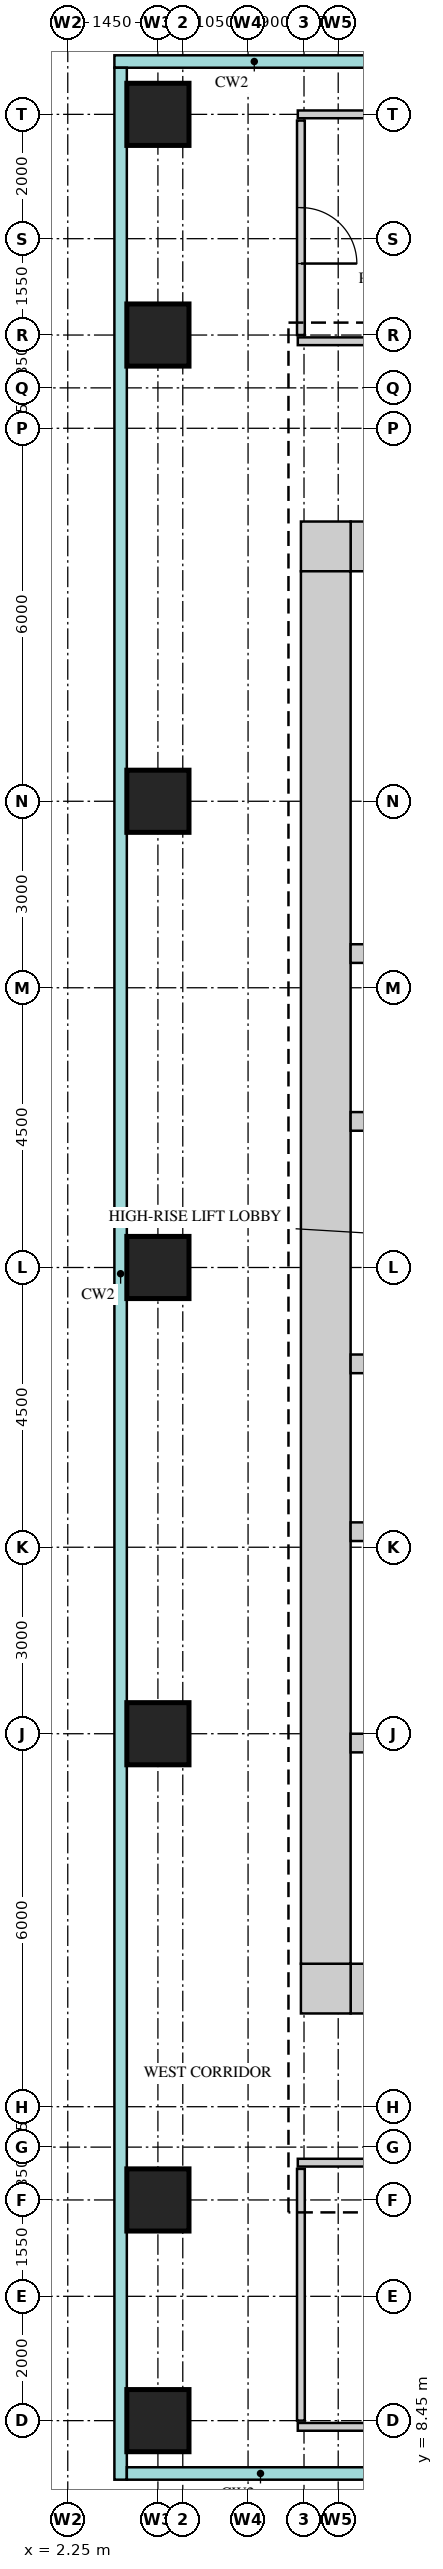
"""IFC4 building model, lengths in metres.
Left out: names, types, materials, properties, quantities, classifications, styles, units other than length and angle.
Written with IfcOpenShell. Run it as: python <this file> out.ifc"""

import sys

from ifc_helpers import new_model, si_unit, direction, frame, frame_2d, origin, origin_2d, place, context, subcontext, project, spatial, rectangle, extrude, source, transform, mapped, element, fill, save


model = new_model("IFC4")
c1 = context("Model", 3, precision=1e-05, world=origin(), true_north=direction((0.0, 1.0)))
c2 = subcontext(c1, "Body", "Model", "MODEL_VIEW")
j1 = project(units=[si_unit("LENGTHUNIT", "METRE"), si_unit("PLANEANGLEUNIT", "RADIAN")], contexts=[c1])
p1 = place(None, origin())
s1 = spatial("IfcSite", under=j1, at=p1, CompositionType="ELEMENT")
p2 = place(p1, origin())
s2 = spatial("IfcBuilding", under=s1, at=p2, CompositionType="ELEMENT")
p3 = place(p2, frame((0.0, 0.0, 184.7)))
s3 = spatial("IfcBuildingStorey", under=s2, at=p3, CompositionType="ELEMENT", Elevation=184.7)
m1 = source(origin(), c2, "Body", "SweptSolid", [
    extrude(rectangle(XDim=13.4, YDim=0.8, at=frame_2d((6.7, 0.0))), origin(), (0.0, 0.0, 1.0), 3.75),
])
p4 = place(p3, frame((6.8, 38.6, 0.0), z_axis=(0.0, 0.0, 1.0), x_axis=(1.0, 0.0, 0.0)))
e1 = element("IfcWall", 1, at=p4, inside=s3, PredefinedType="SHEAR", context=c2, shape_type="MappedRepresentation", body=[
    mapped(m1, transform((0.0, 0.0, 0.0))),
])
m2 = source(origin(), c2, "Body", "SweptSolid", [
    extrude(rectangle(XDim=0.9, YDim=2.1, at=frame_2d((0.45, 1.05))), frame((0.0, 0.41, 0.0), z_axis=(0.0, -1.0, 0.0), x_axis=(1.0, 0.0, 0.0)), (0.0, 0.0, 1.0), 0.82),
])
p5 = place(p4, frame((1.25, 0.0, 0.0)))
e2 = element("IfcOpeningElement", 2, at=p5, cuts=e1, PredefinedType="OPENING", context=c2, shape_type="MappedRepresentation", body=[
    mapped(m2, transform((0.0, 0.0, 0.0))),
])
p6 = place(p4, frame((4.65, 0.0, 0.0)))
e3 = element("IfcOpeningElement", 3, at=p6, cuts=e1, PredefinedType="OPENING", context=c2, shape_type="MappedRepresentation", body=[
    mapped(m2, transform((0.0, 0.0, 0.0))),
])
m3 = source(origin(), c2, "Body", "SweptSolid", [
    extrude(rectangle(XDim=1.0, YDim=2.1, at=frame_2d((0.5, 1.05))), frame((0.0, 0.41, 0.0), z_axis=(0.0, -1.0, 0.0), x_axis=(1.0, 0.0, 0.0)), (0.0, 0.0, 1.0), 0.82),
])
p7 = place(p4, frame((8.0, 0.0, 0.0)))
e4 = element("IfcOpeningElement", 4, at=p7, cuts=e1, PredefinedType="OPENING", context=c2, shape_type="MappedRepresentation", body=[
    mapped(m3, transform((0.0, 0.0, 0.0))),
])
p8 = place(p4, frame((11.35, 0.0, 0.0)))
e5 = element("IfcOpeningElement", 5, at=p8, cuts=e1, PredefinedType="OPENING", context=c2, shape_type="MappedRepresentation", body=[
    mapped(m2, transform((0.0, 0.0, 0.0))),
])
m4 = source(origin(), c2, "Body", "SweptSolid", [
    extrude(rectangle(XDim=0.8, YDim=0.8, at=frame_2d((0.4, 0.0))), origin(), (0.0, 0.0, 1.0), 3.75),
])
p9 = place(p3, frame((6.0, 38.6, 0.0), z_axis=(0.0, 0.0, 1.0), x_axis=(1.0, 0.0, 0.0)))
e6 = element("IfcWall", 6, at=p9, inside=s3, PredefinedType="SHEAR", context=c2, shape_type="MappedRepresentation", body=[
    mapped(m4, transform((0.0, 0.0, 0.0))),
])
p10 = place(p3, frame((6.8, 15.4, 0.0), z_axis=(0.0, 0.0, 1.0), x_axis=(1.0, 0.0, 0.0)))
e7 = element("IfcWall", 7, at=p10, inside=s3, PredefinedType="SHEAR", context=c2, shape_type="MappedRepresentation", body=[
    mapped(m1, transform((0.0, 0.0, 0.0))),
])
m5 = source(origin(), c2, "Body", "SweptSolid", [
    extrude(rectangle(XDim=1.2, YDim=2.1, at=frame_2d((0.6, 1.05))), frame((0.0, 0.41, 0.0), z_axis=(0.0, -1.0, 0.0), x_axis=(1.0, 0.0, 0.0)), (0.0, 0.0, 1.0), 0.82),
])
p11 = place(p10, frame((5.4, 0.0, 0.0)))
e8 = element("IfcOpeningElement", 8, at=p11, cuts=e7, PredefinedType="OPENING", context=c2, shape_type="MappedRepresentation", body=[
    mapped(m5, transform((0.0, 0.0, 0.0))),
])
p12 = place(p10, frame((2.05, 0.0, 0.0)))
e9 = element("IfcOpeningElement", 9, at=p12, cuts=e7, PredefinedType="OPENING", context=c2, shape_type="MappedRepresentation", body=[
    mapped(m5, transform((0.0, 0.0, 0.0))),
])
p13 = place(p10, frame((7.9, 0.0, 0.0)))
e10 = element("IfcOpeningElement", 10, at=p13, cuts=e7, PredefinedType="OPENING", context=c2, shape_type="MappedRepresentation", body=[
    mapped(m3, transform((0.0, 0.0, 0.0))),
])
p14 = place(p3, frame((6.0, 15.4, 0.0), z_axis=(0.0, 0.0, 1.0), x_axis=(1.0, 0.0, 0.0)))
e11 = element("IfcWall", 11, at=p14, inside=s3, PredefinedType="SHEAR", context=c2, shape_type="MappedRepresentation", body=[
    mapped(m4, transform((0.0, 0.0, 0.0))),
])
m6 = source(origin(), c2, "Body", "SweptSolid", [
    extrude(rectangle(XDim=22.4, YDim=0.8, at=frame_2d((11.2, 0.0))), origin(), (0.0, 0.0, 1.0), 3.75),
])
p15 = place(p3, frame((6.4, 15.8, 0.0), z_axis=(0.0, 0.0, 1.0), x_axis=(0.0, 1.0, 0.0)))
e12 = element("IfcWall", 12, at=p15, inside=s3, PredefinedType="SHEAR", context=c2, shape_type="MappedRepresentation", body=[
    mapped(m6, transform((0.0, 0.0, 0.0))),
])
m7 = source(origin(), c2, "Body", "SweptSolid", [
    extrude(rectangle(XDim=13.4, YDim=0.3, at=frame_2d((6.7, 0.0))), origin(), (0.0, 0.0, 1.0), 3.75),
])
p16 = place(p3, frame((6.8, 22.75, 0.0), z_axis=(0.0, 0.0, 1.0), x_axis=(1.0, 0.0, 0.0)))
e13 = element("IfcWall", 13, at=p16, inside=s3, PredefinedType="STANDARD", context=c2, shape_type="MappedRepresentation", body=[
    mapped(m7, transform((0.0, 0.0, 0.0))),
])
m8 = source(origin(), c2, "Body", "SweptSolid", [
    extrude(rectangle(XDim=9.275, YDim=0.3, at=frame_2d((4.637, 0.0))), origin(), (0.0, 0.0, 1.0), 3.75),
])
p17 = place(p3, frame((6.8, 19.35, 0.0), z_axis=(0.0, 0.0, 1.0), x_axis=(1.0, 0.0, 0.0)))
e14 = element("IfcWall", 14, at=p17, inside=s3, PredefinedType="STANDARD", context=c2, shape_type="MappedRepresentation", body=[
    mapped(m8, transform((0.0, 0.0, 0.0))),
])
m9 = source(origin(), c2, "Body", "SweptSolid", [
    extrude(rectangle(XDim=1.2, YDim=2.1, at=frame_2d((0.6, 1.05))), frame((0.0, 0.16, 0.0), z_axis=(0.0, -1.0, 0.0), x_axis=(1.0, 0.0, 0.0)), (0.0, 0.0, 1.0), 0.32),
])
p18 = place(p17, frame((0.85, 0.0, 0.0)))
e15 = element("IfcOpeningElement", 15, at=p18, cuts=e14, PredefinedType="OPENING", context=c2, shape_type="MappedRepresentation", body=[
    mapped(m9, transform((0.0, 0.0, 0.0))),
])
p19 = place(p17, frame((3.2, 0.0, 0.0)))
e16 = element("IfcOpeningElement", 16, at=p19, cuts=e14, PredefinedType="OPENING", context=c2, shape_type="MappedRepresentation", body=[
    mapped(m9, transform((0.0, 0.0, 0.0))),
])
p20 = place(p17, frame((5.45, 0.0, 0.0)))
e17 = element("IfcOpeningElement", 17, at=p20, cuts=e14, PredefinedType="OPENING", context=c2, shape_type="MappedRepresentation", body=[
    mapped(m9, transform((0.0, 0.0, 0.0))),
])
p21 = place(p17, frame((7.6, 0.0, 0.0)))
e18 = element("IfcOpeningElement", 18, at=p21, cuts=e14, PredefinedType="OPENING", context=c2, shape_type="MappedRepresentation", body=[
    mapped(m9, transform((0.0, 0.0, 0.0))),
])
p22 = place(p3, frame((6.8, 32.05, 0.0), z_axis=(0.0, 0.0, 1.0), x_axis=(1.0, 0.0, 0.0)))
e19 = element("IfcWall", 19, at=p22, inside=s3, PredefinedType="STANDARD", context=c2, shape_type="MappedRepresentation", body=[
    mapped(m7, transform((0.0, 0.0, 0.0))),
])
p23 = place(p3, frame((6.8, 29.35, 0.0), z_axis=(0.0, 0.0, 1.0), x_axis=(1.0, 0.0, 0.0)))
e20 = element("IfcWall", 20, at=p23, inside=s3, PredefinedType="STANDARD", context=c2, shape_type="MappedRepresentation", body=[
    mapped(m7, transform((0.0, 0.0, 0.0))),
])
p24 = place(p23, frame((0.95, 0.0, 0.0)))
e21 = element("IfcOpeningElement", 21, at=p24, cuts=e20, PredefinedType="OPENING", context=c2, shape_type="MappedRepresentation", body=[
    mapped(m9, transform((0.0, 0.0, 0.0))),
])
p25 = place(p23, frame((3.5, 0.0, 0.0)))
e22 = element("IfcOpeningElement", 22, at=p25, cuts=e20, PredefinedType="OPENING", context=c2, shape_type="MappedRepresentation", body=[
    mapped(m9, transform((0.0, 0.0, 0.0))),
])
p26 = place(p23, frame((6.05, 0.0, 0.0)))
e23 = element("IfcOpeningElement", 23, at=p26, cuts=e20, PredefinedType="OPENING", context=c2, shape_type="MappedRepresentation", body=[
    mapped(m9, transform((0.0, 0.0, 0.0))),
])
p27 = place(p23, frame((8.6, 0.0, 0.0)))
e24 = element("IfcOpeningElement", 24, at=p27, cuts=e20, PredefinedType="OPENING", context=c2, shape_type="MappedRepresentation", body=[
    mapped(m9, transform((0.0, 0.0, 0.0))),
])
p28 = place(p23, frame((11.15, 0.0, 0.0)))
e25 = element("IfcOpeningElement", 25, at=p28, cuts=e20, PredefinedType="OPENING", context=c2, shape_type="MappedRepresentation", body=[
    mapped(m9, transform((0.0, 0.0, 0.0))),
])
p29 = place(p3, frame((6.8, 25.45, 0.0), z_axis=(0.0, 0.0, 1.0), x_axis=(1.0, 0.0, 0.0)))
e26 = element("IfcWall", 26, at=p29, inside=s3, PredefinedType="STANDARD", context=c2, shape_type="MappedRepresentation", body=[
    mapped(m7, transform((0.0, 0.0, 0.0))),
])
p30 = place(p29, frame((0.95, 0.0, 0.0)))
e27 = element("IfcOpeningElement", 27, at=p30, cuts=e26, PredefinedType="OPENING", context=c2, shape_type="MappedRepresentation", body=[
    mapped(m9, transform((0.0, 0.0, 0.0))),
])
p31 = place(p29, frame((3.5, 0.0, 0.0)))
e28 = element("IfcOpeningElement", 28, at=p31, cuts=e26, PredefinedType="OPENING", context=c2, shape_type="MappedRepresentation", body=[
    mapped(m9, transform((0.0, 0.0, 0.0))),
])
p32 = place(p29, frame((6.05, 0.0, 0.0)))
e29 = element("IfcOpeningElement", 29, at=p32, cuts=e26, PredefinedType="OPENING", context=c2, shape_type="MappedRepresentation", body=[
    mapped(m9, transform((0.0, 0.0, 0.0))),
])
p33 = place(p29, frame((8.6, 0.0, 0.0)))
e30 = element("IfcOpeningElement", 30, at=p33, cuts=e26, PredefinedType="OPENING", context=c2, shape_type="MappedRepresentation", body=[
    mapped(m9, transform((0.0, 0.0, 0.0))),
])
p34 = place(p29, frame((11.15, 0.0, 0.0)))
e31 = element("IfcOpeningElement", 31, at=p34, cuts=e26, PredefinedType="OPENING", context=c2, shape_type="MappedRepresentation", body=[
    mapped(m9, transform((0.0, 0.0, 0.0))),
])
m10 = source(origin(), c2, "Body", "SweptSolid", [
    extrude(rectangle(XDim=1.0, YDim=1.0, at=origin_2d()), origin(), (0.0, 0.0, 1.0), 3.75),
])
for number, where, z_axis, x_axis in (
    (32, (3.7, 8.45, 0.0), (0.0, 0.0, 1.0), (1.0, 0.0, 0.0)),
    (33, (3.7, 12.0, 0.0), (0.0, 0.0, 1.0), (1.0, 0.0, 0.0)),
    (34, (3.7, 19.5, 0.0), (0.0, 0.0, 1.0), (1.0, 0.0, 0.0)),
    (35, (3.7, 27.0, 0.0), (0.0, 0.0, 1.0), (1.0, 0.0, 0.0)),
    (36, (3.7, 34.5, 0.0), (0.0, 0.0, 1.0), (1.0, 0.0, 0.0)),
    (37, (3.7, 42.0, 0.0), (0.0, 0.0, 1.0), (1.0, 0.0, 0.0)),
    (38, (3.7, 45.55, 0.0), (0.0, 0.0, 1.0), (1.0, 0.0, 0.0)),
):
    element("IfcColumn", number, at=place(p3, frame(where, z_axis=z_axis, x_axis=x_axis)), inside=s3, PredefinedType="COLUMN", context=c2, shape_type="MappedRepresentation", body=[
        mapped(m10, transform((0.0, 0.0, 0.0))),
    ])
m11 = source(origin(), c2, "Body", "SweptSolid", [
    extrude(rectangle(XDim=7.95, YDim=0.125, at=frame_2d((3.975, 0.0))), origin(), (0.0, 0.0, 1.0), 3.25),
])
p35 = place(p3, frame((5.95, 8.35, 0.0), z_axis=(0.0, 0.0, 1.0), x_axis=(1.0, 0.0, 0.0)))
e39 = element("IfcWall", 39, at=p35, inside=s3, PredefinedType="PARTITIONING", context=c2, shape_type="MappedRepresentation", body=[
    mapped(m11, transform((0.0, 0.0, 0.0))),
])
m12 = source(origin(), c2, "Body", "SweptSolid", [
    extrude(rectangle(XDim=0.9, YDim=2.1, at=frame_2d((0.45, 1.05))), frame((0.0, 0.073, 0.0), z_axis=(0.0, -1.0, 0.0), x_axis=(1.0, 0.0, 0.0)), (0.0, 0.0, 1.0), 0.145),
])
p36 = place(p35, frame((3.8, 0.0, 0.0)))
e40 = element("IfcOpeningElement", 40, at=p36, cuts=e39, PredefinedType="OPENING", context=c2, shape_type="MappedRepresentation", body=[
    mapped(m12, transform((0.0, 0.0, 0.0))),
])
m13 = source(origin(), c2, "Body", "SweptSolid", [
    extrude(rectangle(XDim=4.05, YDim=0.125, at=frame_2d((2.025, 0.0))), origin(), (0.0, 0.0, 1.0), 3.8),
])
p37 = place(p3, frame((6.0, 8.45, 0.0), z_axis=(0.0, 0.0, 1.0), x_axis=(0.0, 1.0, 0.0)))
e41 = element("IfcWall", 41, at=p37, inside=s3, PredefinedType="PARTITIONING", context=c2, shape_type="MappedRepresentation", body=[
    mapped(m13, transform((0.0, 0.0, 0.0))),
])
m14 = source(origin(), c2, "Body", "SweptSolid", [
    extrude(rectangle(XDim=8.0, YDim=0.125, at=frame_2d((4.0, 0.0))), origin(), (0.0, 0.0, 1.0), 3.8),
])
p38 = place(p3, frame((5.95, 12.6, 0.0), z_axis=(0.0, 0.0, 1.0), x_axis=(1.0, 0.0, 0.0)))
e42 = element("IfcWall", 42, at=p38, inside=s3, PredefinedType="PARTITIONING", context=c2, shape_type="MappedRepresentation", body=[
    mapped(m14, transform((0.0, 0.0, 0.0))),
])
m15 = source(origin(), c2, "Body", "SweptSolid", [
    extrude(rectangle(XDim=7.95, YDim=0.125, at=frame_2d((3.975, 0.0))), origin(), (0.0, 0.0, 1.0), 3.8),
])
p39 = place(p3, frame((5.95, 41.9, 0.0), z_axis=(0.0, 0.0, 1.0), x_axis=(1.0, 0.0, 0.0)))
e43 = element("IfcWall", 43, at=p39, inside=s3, PredefinedType="PARTITIONING", context=c2, shape_type="MappedRepresentation", body=[
    mapped(m15, transform((0.0, 0.0, 0.0))),
])
p40 = place(p39, frame((5.05, 0.0, 0.0)))
e44 = element("IfcOpeningElement", 44, at=p40, cuts=e43, PredefinedType="OPENING", context=c2, shape_type="MappedRepresentation", body=[
    mapped(m12, transform((0.0, 0.0, 0.0))),
])
m16 = source(origin(), c2, "Body", "SweptSolid", [
    extrude(rectangle(XDim=3.45, YDim=0.125, at=frame_2d((1.725, 0.0))), origin(), (0.0, 0.0, 1.0), 3.8),
])
p41 = place(p3, frame((6.0, 42.0, 0.0), z_axis=(0.0, 0.0, 1.0), x_axis=(0.0, 1.0, 0.0)))
e45 = element("IfcWall", 45, at=p41, inside=s3, PredefinedType="PARTITIONING", context=c2, shape_type="MappedRepresentation", body=[
    mapped(m16, transform((0.0, 0.0, 0.0))),
])
p42 = place(p41, frame((1.15, 0.0, 0.0)))
e46 = element("IfcOpeningElement", 46, at=p42, cuts=e45, PredefinedType="OPENING", context=c2, shape_type="MappedRepresentation", body=[
    mapped(m12, transform((0.0, 0.0, 0.0))),
])
p43 = place(p3, frame((5.95, 45.55, 0.0), z_axis=(0.0, 0.0, 1.0), x_axis=(1.0, 0.0, 0.0)))
e47 = element("IfcWall", 47, at=p43, inside=s3, PredefinedType="PARTITIONING", context=c2, shape_type="MappedRepresentation", body=[
    mapped(m11, transform((0.0, 0.0, 0.0))),
])
m17 = source(origin(), c2, "Body", "SweptSolid", [
    extrude(rectangle(XDim=0.9, YDim=2.1, at=frame_2d((0.45, 1.05))), frame((0.0, 0.025, 0.0), z_axis=(0.0, -1.0, 0.0), x_axis=(1.0, 0.0, 0.0)), (0.0, 0.0, 1.0), 0.05),
])
p44 = place(p42, origin())
e48 = element("IfcDoor", 48, at=p44, inside=s3, OperationType="SINGLE_SWING_LEFT", PredefinedType="DOOR", context=c2, shape_type="MappedRepresentation", body=[
    mapped(m17, transform((0.0, 0.0, 0.0))),
])
fill(e46, e48)
save(model, sys.argv[1])
